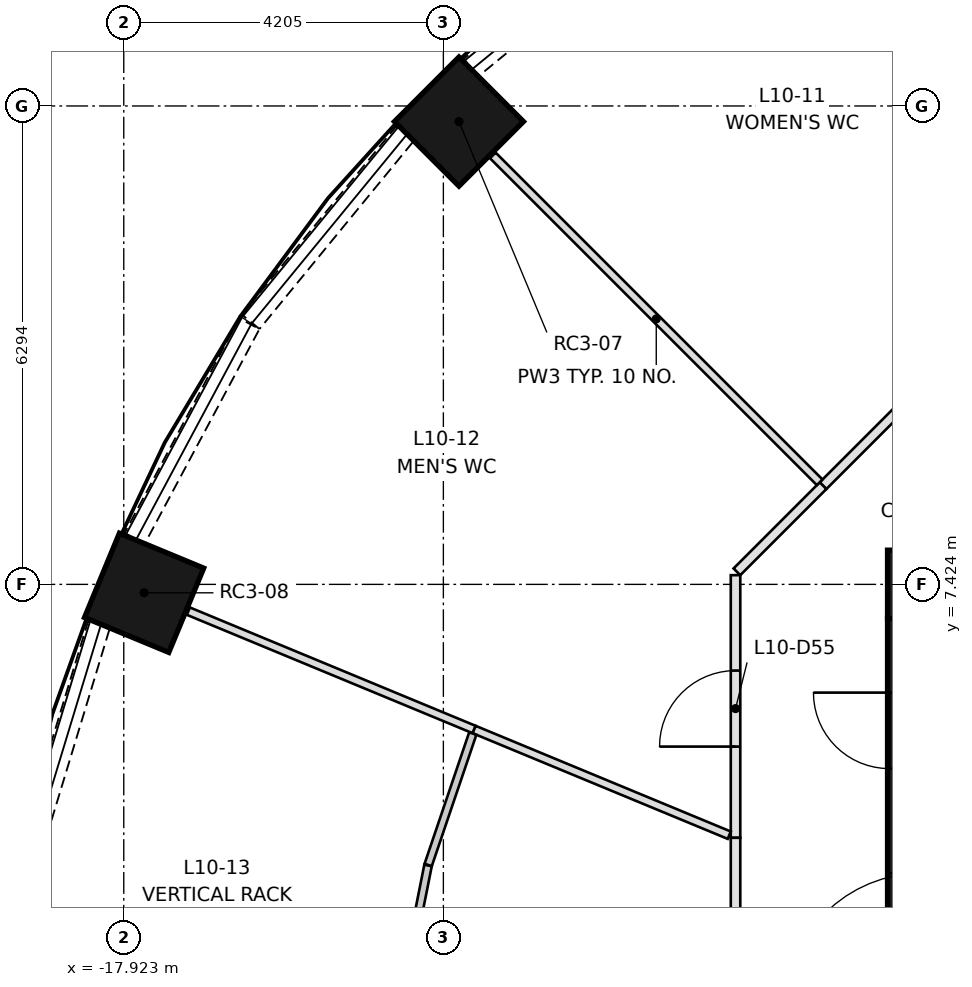
"""IFC4 building model, lengths in metres.
Left out: names, types, materials, properties, quantities, classifications, styles, units other than length and angle.
Written with IfcOpenShell. Run it as: python <this file> out.ifc"""

import sys

from ifc_helpers import new_model, si_unit, direction, frame, frame_2d, origin, origin_2d, place, context, subcontext, project, spatial, rectangle, extrude, element, fill, save


model = new_model("IFC4")
c1 = context("Model", 3, precision=1e-05, world=origin(), true_north=direction((0.0, 1.0)))
c2 = subcontext(c1, "Body", "Model", "MODEL_VIEW")
j1 = project(units=[si_unit("LENGTHUNIT", "METRE"), si_unit("PLANEANGLEUNIT", "RADIAN")], contexts=[c1])
p1 = place(None, origin())
s1 = spatial("IfcSite", under=j1, at=p1, CompositionType="ELEMENT")
p2 = place(p1, origin())
s2 = spatial("IfcBuilding", under=s1, at=p2, CompositionType="ELEMENT")
p3 = place(p2, frame((0.0, 0.0, 40.8)))
s3 = spatial("IfcBuildingStorey", under=s2, at=p3, CompositionType="ELEMENT", Elevation=40.8)
for number, where, z_axis, x_axis in (
    (1, (-13.513, 13.513, 0.0), (0.0, 0.0, 1.0), (-0.707, 0.707, 0.0)),
    (2, (-17.655, 7.313, 0.0), (0.0, 0.0, 1.0), (-0.924, 0.383, 0.0)),
):
    element("IfcColumn", number, at=place(p3, frame(where, z_axis=z_axis, x_axis=x_axis)), inside=s3, PredefinedType="COLUMN", context=c2, shape_type="SweptSolid", body=[
        extrude(rectangle(XDim=1.2, YDim=1.2, at=origin_2d()), origin(), (0.0, 0.0, 1.0), 3.65),
    ])
p4 = place(p3, frame((-7.874, 7.424, 0.0), z_axis=(0.0, 0.0, 1.0), x_axis=(1.0, 0.0, 0.0)))
e3 = element("IfcWall", 3, at=p4, inside=s3, PredefinedType="SHEAR", context=c2, shape_type="SweptSolid", body=[
    extrude(rectangle(XDim=15.748, YDim=0.9, at=frame_2d((7.874, 0.0))), origin(), (0.0, 0.0, 1.0), 3.65),
])
p5 = place(p3, frame((-7.424, -6.974, 0.0), z_axis=(0.0, 0.0, 1.0), x_axis=(0.0, 1.0, 0.0)))
e4 = element("IfcWall", 4, at=p5, inside=s3, PredefinedType="SHEAR", context=c2, shape_type="SweptSolid", body=[
    extrude(rectangle(XDim=13.948, YDim=0.9, at=frame_2d((6.974, 0.0))), origin(), (0.0, 0.0, 1.0), 3.65),
])
p6 = place(p5, frame((6.474, 0.0, 0.0)))
e5 = element("IfcOpeningElement", 5, at=p6, cuts=e4, PredefinedType="OPENING", context=c2, shape_type="SweptSolid", body=[
    extrude(rectangle(XDim=1.0, YDim=2.1, at=frame_2d((0.5, 1.05))), frame((0.0, 0.46, 0.0), z_axis=(0.0, -1.0, 0.0), x_axis=(1.0, 0.0, 0.0)), (0.0, 0.0, 1.0), 0.92),
])
p7 = place(p5, frame((3.35, 0.0, 0.0)))
e6 = element("IfcOpeningElement", 6, at=p7, cuts=e4, PredefinedType="OPENING", context=c2, shape_type="SweptSolid", body=[
    extrude(rectangle(XDim=1.8, YDim=2.1, at=frame_2d((0.9, 1.05))), frame((0.0, 0.46, 0.0), z_axis=(0.0, -1.0, 0.0), x_axis=(1.0, 0.0, 0.0)), (0.0, 0.0, 1.0), 0.92),
])
p8 = place(p5, frame((8.799, 0.0, 0.0)))
e7 = element("IfcOpeningElement", 7, at=p8, cuts=e4, PredefinedType="OPENING", context=c2, shape_type="SweptSolid", body=[
    extrude(rectangle(XDim=1.8, YDim=2.1, at=frame_2d((0.9, 1.05))), frame((0.0, 0.46, 0.0), z_axis=(0.0, -1.0, 0.0), x_axis=(1.0, 0.0, 0.0)), (0.0, 0.0, 1.0), 0.92),
])
p9 = place(p5, frame((11.974, 0.0, 0.0)))
e8 = element("IfcOpeningElement", 8, at=p9, cuts=e4, PredefinedType="OPENING", context=c2, shape_type="SweptSolid", body=[
    extrude(rectangle(XDim=1.0, YDim=2.1, at=frame_2d((0.5, 1.05))), frame((0.0, 0.46, 0.0), z_axis=(0.0, -1.0, 0.0), x_axis=(1.0, 0.0, 0.0)), (0.0, 0.0, 1.0), 0.92),
])
for number, where, z_axis, x_axis in (
    (9, (-10.879, 16.253, 0.0), (0.0, 0.0, 1.0), (-0.773, -0.634, 0.0)),
    (10, (-14.222, 13.354, 0.0), (0.0, 0.0, 1.0), (-0.634, -0.773, 0.0)),
):
    element("IfcWall", number, at=place(p3, frame(where, z_axis=z_axis, x_axis=x_axis)), inside=s3, PredefinedType="SOLIDWALL", context=c2, shape_type="SweptSolid", body=[
        extrude(rectangle(XDim=3.202, YDim=0.3, at=frame_2d((1.601, 0.0))), origin(), (0.0, 0.0, 1.0), 0.9),
    ])
p10 = place(p3, frame((-16.27, 10.854, 0.0), z_axis=(0.0, 0.0, 1.0), x_axis=(-0.471284265614, -0.881981372243, 0.0)))
e11 = element("IfcWall", 11, at=p10, inside=s3, PredefinedType="SOLIDWALL", context=c2, shape_type="SweptSolid", body=[
    extrude(rectangle(XDim=3.204, YDim=0.3, at=frame_2d((1.602, 0.0))), origin(), (0.0, 0.0, 1.0), 0.9),
])
p11 = place(p3, frame((-18.25, 6.895, 0.0), z_axis=(0.0, 0.0, 1.0), x_axis=(-0.290472877795, -0.956883225512, 0.0)))
e12 = element("IfcWall", 12, at=p11, inside=s3, PredefinedType="SOLIDWALL", context=c2, shape_type="SweptSolid", body=[
    extrude(rectangle(XDim=3.202, YDim=0.3, at=frame_2d((1.601, 0.0))), origin(), (0.0, 0.0, 1.0), 0.9),
])
p12 = place(p3, frame((-8.722, 8.722, 0.0), z_axis=(0.0, 0.0, 1.0), x_axis=(0.707030604857, 0.70718294931, 0.0)))
e13 = element("IfcWall", 13, at=p12, inside=s3, PredefinedType="PARTITIONING", context=c2, shape_type="SweptSolid", body=[
    extrude(rectangle(XDim=1.603, YDim=0.125, at=frame_2d((0.801, 0.0))), origin(), (0.0, 0.0, 1.0), 3.3),
])
p13 = place(p3, frame((-9.874, 4.09, 0.0), z_axis=(0.0, 0.0, 1.0), x_axis=(0.0, 1.0, 0.0)))
e14 = element("IfcWall", 14, at=p13, inside=s3, PredefinedType="PARTITIONING", context=c2, shape_type="SweptSolid", body=[
    extrude(rectangle(XDim=3.455, YDim=0.125, at=frame_2d((1.728, 0.0))), origin(), (0.0, 0.0, 1.0), 3.3),
])
p14 = place(p13, frame((1.2, 0.0, 0.0)))
e15 = element("IfcOpeningElement", 15, at=p14, cuts=e14, PredefinedType="OPENING", context=c2, shape_type="SweptSolid", body=[
    extrude(rectangle(XDim=1.0, YDim=2.1, at=frame_2d((0.5, 1.05))), frame((0.0, 0.073, 0.0), z_axis=(0.0, -1.0, 0.0), x_axis=(1.0, 0.0, 0.0)), (0.0, 0.0, 1.0), 0.145),
])
p15 = place(p3, frame((-9.856, 7.589, 0.0), z_axis=(0.0, 0.0, 1.0), x_axis=(0.70718294931, 0.707030604857, 0.0)))
e16 = element("IfcWall", 16, at=p15, inside=s3, PredefinedType="PARTITIONING", context=c2, shape_type="SweptSolid", body=[
    extrude(rectangle(XDim=1.603, YDim=0.125, at=frame_2d((0.801, 0.0))), origin(), (0.0, 0.0, 1.0), 3.3),
])
p16 = place(p3, frame((-9.874, -4.09, 0.0), z_axis=(0.0, 0.0, 1.0), x_axis=(0.0, 1.0, 0.0)))
e17 = element("IfcWall", 17, at=p16, inside=s3, PredefinedType="PARTITIONING", context=c2, shape_type="SweptSolid", body=[
    extrude(rectangle(XDim=8.18, YDim=0.125, at=frame_2d((4.09, 0.0))), origin(), (0.0, 0.0, 1.0), 3.3),
])
p17 = place(p16, frame((3.6, 0.0, 0.0)))
e18 = element("IfcOpeningElement", 18, at=p17, cuts=e17, PredefinedType="OPENING", context=c2, shape_type="SweptSolid", body=[
    extrude(rectangle(XDim=1.0, YDim=2.1, at=frame_2d((0.5, 1.05))), frame((0.0, 0.073, 0.0), z_axis=(0.0, -1.0, 0.0), x_axis=(1.0, 0.0, 0.0)), (0.0, 0.0, 1.0), 0.145),
])
p18 = place(p3, frame((-8.767, 8.767, 0.0), z_axis=(0.0, 0.0, 1.0), x_axis=(-0.707106781187, 0.707106781187, 0.0)))
e19 = element("IfcWall", 19, at=p18, inside=s3, PredefinedType="PARTITIONING", context=c2, shape_type="SweptSolid", body=[
    extrude(rectangle(XDim=6.082, YDim=0.105, at=frame_2d((3.041, 0.0))), origin(), (0.0, 0.0, 1.0), 3.3),
])
p19 = place(p3, frame((-13.313, 5.514, 0.0), z_axis=(0.0, 0.0, 1.0), x_axis=(-0.923873536763, 0.382697907061, 0.0)))
e20 = element("IfcWall", 20, at=p19, inside=s3, PredefinedType="PARTITIONING", context=c2, shape_type="SweptSolid", body=[
    extrude(rectangle(XDim=4.07, YDim=0.105, at=frame_2d((2.035, 0.0))), origin(), (0.0, 0.0, 1.0), 3.3),
])
p20 = place(p3, frame((-9.957, 4.124, 0.0), z_axis=(0.0, 0.0, 1.0), x_axis=(-0.923870220065, 0.382705913825, 0.0)))
e21 = element("IfcWall", 21, at=p20, inside=s3, PredefinedType="PARTITIONING", context=c2, shape_type="SweptSolid", body=[
    extrude(rectangle(XDim=3.633, YDim=0.105, at=frame_2d((1.816, 0.0))), origin(), (0.0, 0.0, 1.0), 3.3),
])
p21 = place(p3, frame((-13.92, 3.726, 0.0), z_axis=(0.0, 0.0, 1.0), x_axis=(-0.195091231684, -0.980785099459, 0.0)))
e22 = element("IfcWall", 22, at=p21, inside=s3, PredefinedType="PARTITIONING", context=c2, shape_type="SweptSolid", body=[
    extrude(rectangle(XDim=1.878, YDim=0.1, at=frame_2d((0.939, 0.0))), origin(), (0.0, 0.0, 1.0), 3.3),
])
p22 = place(p3, frame((-13.331, 5.461, 0.0), z_axis=(0.0, 0.0, 1.0), x_axis=(-0.321478362794, -0.946916924685, 0.0)))
e23 = element("IfcWall", 23, at=p22, inside=s3, PredefinedType="PARTITIONING", context=c2, shape_type="SweptSolid", body=[
    extrude(rectangle(XDim=1.826, YDim=0.1, at=frame_2d((0.913, 0.0))), origin(), (0.0, 0.0, 1.0), 3.3),
])
p23 = place(p9, origin())
e24 = element("IfcDoor", 24, at=p23, inside=s3, OperationType="SINGLE_SWING_RIGHT", PredefinedType="DOOR", context=c2, shape_type="SweptSolid", body=[
    extrude(rectangle(XDim=1.0, YDim=2.1, at=frame_2d((0.5, 1.05))), frame((0.0, 0.45, 0.0), z_axis=(0.0, -1.0, 0.0), x_axis=(1.0, 0.0, 0.0)), (0.0, 0.0, 1.0), 0.05),
])
fill(e8, e24)
p24 = place(p14, origin())
e25 = element("IfcDoor", 25, at=p24, inside=s3, OperationType="SINGLE_SWING_LEFT", PredefinedType="DOOR", context=c2, shape_type="SweptSolid", body=[
    extrude(rectangle(XDim=1.0, YDim=2.1, at=frame_2d((0.5, 1.05))), frame((0.0, 0.025, 0.0), z_axis=(0.0, -1.0, 0.0), x_axis=(1.0, 0.0, 0.0)), (0.0, 0.0, 1.0), 0.05),
])
fill(e15, e25)
save(model, sys.argv[1])
